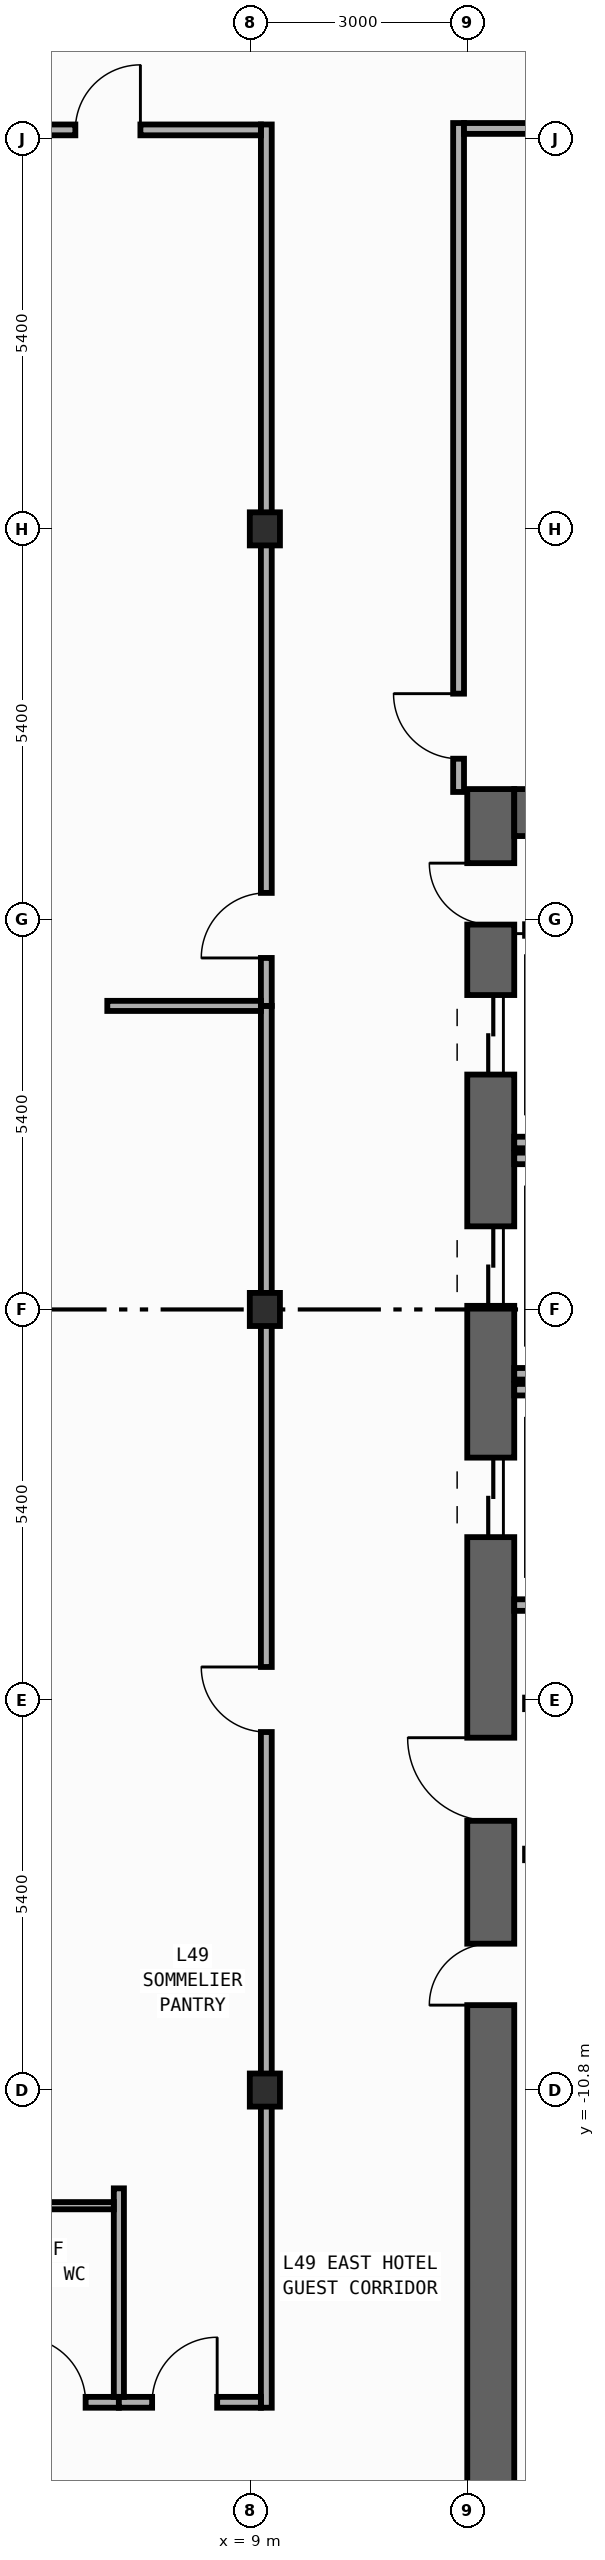
"""IFC4 building model, lengths in metres.
Left out: names, types, materials, properties, quantities, classifications, styles, units other than length and angle.
Written with IfcOpenShell. Run it as: python <this file> out.ifc"""

import sys

from ifc_helpers import new_model, si_unit, direction, frame, frame_2d, origin, origin_2d, place, context, subcontext, project, spatial, rectangle, i_section, extrude, element, fill, save


model = new_model("IFC4")
c1 = context("Model", 3, precision=1e-05, world=origin(), true_north=direction((0.0, 1.0)))
c2 = subcontext(c1, "Body", "Model", "MODEL_VIEW")
j1 = project(units=[si_unit("LENGTHUNIT", "METRE"), si_unit("PLANEANGLEUNIT", "RADIAN")], contexts=[c1])
p1 = place(None, origin())
s1 = spatial("IfcSite", under=j1, at=p1, CompositionType="ELEMENT")
p2 = place(p1, origin())
s2 = spatial("IfcBuilding", under=s1, at=p2, CompositionType="ELEMENT")
p3 = place(p2, frame((0.0, 0.0, 210.6)))
s3 = spatial("IfcBuildingStorey", under=s2, at=p3, CompositionType="ELEMENT", Elevation=210.6)
p4 = place(p3, frame((12.325, -19.8, 0.0), z_axis=(0.0, 0.0, 1.0), x_axis=(0.0, 1.0, 0.0)))
e1 = element("IfcWall", 1, at=p4, inside=s3, PredefinedType="SHEAR", context=c2, shape_type="SweptSolid", body=[
    extrude(rectangle(XDim=27.0, YDim=0.65, at=frame_2d((13.5, 0.0))), origin(), (0.0, 0.0, 1.0), 3.45),
])
p5 = place(p4, frame((23.05, 0.0, 0.0)))
e2 = element("IfcOpeningElement", 2, at=p5, cuts=e1, PredefinedType="OPENING", context=c2, shape_type="SweptSolid", body=[
    extrude(rectangle(XDim=1.1, YDim=2.2, at=frame_2d((0.55, 1.1))), frame((0.0, 0.335, 0.0), z_axis=(0.0, -1.0, 0.0), x_axis=(1.0, 0.0, 0.0)), (0.0, 0.0, 1.0), 0.67),
])
p6 = place(p4, frame((19.85, 0.0, 0.0)))
e3 = element("IfcOpeningElement", 3, at=p6, cuts=e1, PredefinedType="OPENING", context=c2, shape_type="SweptSolid", body=[
    extrude(rectangle(XDim=1.1, YDim=2.2, at=frame_2d((0.55, 1.1))), frame((0.0, 0.335, 0.0), z_axis=(0.0, -1.0, 0.0), x_axis=(1.0, 0.0, 0.0)), (0.0, 0.0, 1.0), 0.67),
])
p7 = place(p4, frame((16.65, 0.0, 0.0)))
e4 = element("IfcOpeningElement", 4, at=p7, cuts=e1, PredefinedType="OPENING", context=c2, shape_type="SweptSolid", body=[
    extrude(rectangle(XDim=1.1, YDim=2.2, at=frame_2d((0.55, 1.1))), frame((0.0, 0.335, 0.0), z_axis=(0.0, -1.0, 0.0), x_axis=(1.0, 0.0, 0.0)), (0.0, 0.0, 1.0), 0.67),
])
p8 = place(p4, frame((10.175, 0.0, 0.0)))
e5 = element("IfcOpeningElement", 5, at=p8, cuts=e1, PredefinedType="OPENING", context=c2, shape_type="SweptSolid", body=[
    extrude(rectangle(XDim=0.85, YDim=2.1, at=frame_2d((0.425, 1.05))), frame((0.0, 0.335, 0.0), z_axis=(0.0, -1.0, 0.0), x_axis=(1.0, 0.0, 0.0)), (0.0, 0.0, 1.0), 0.67),
])
p9 = place(p4, frame((12.725, 0.0, 0.0)))
e6 = element("IfcOpeningElement", 6, at=p9, cuts=e1, PredefinedType="OPENING", context=c2, shape_type="SweptSolid", body=[
    extrude(rectangle(XDim=1.15, YDim=2.2, at=frame_2d((0.575, 1.1))), frame((0.0, 0.335, 0.0), z_axis=(0.0, -1.0, 0.0), x_axis=(1.0, 0.0, 0.0)), (0.0, 0.0, 1.0), 0.67),
])
p10 = place(p4, frame((25.125, 0.0, 0.0)))
e7 = element("IfcOpeningElement", 7, at=p10, cuts=e1, PredefinedType="OPENING", context=c2, shape_type="SweptSolid", body=[
    extrude(rectangle(XDim=0.85, YDim=2.1, at=frame_2d((0.425, 1.05))), frame((0.0, 0.335, 0.0), z_axis=(0.0, -1.0, 0.0), x_axis=(1.0, 0.0, 0.0)), (0.0, 0.0, 1.0), 0.67),
])
p11 = place(p3, frame((12.65, 6.875, 0.0), z_axis=(0.0, 0.0, 1.0), x_axis=(1.0, 0.0, 0.0)))
e8 = element("IfcWall", 8, at=p11, inside=s3, PredefinedType="SHEAR", context=c2, shape_type="SweptSolid", body=[
    extrude(rectangle(XDim=7.1, YDim=0.65, at=frame_2d((3.55, 0.0))), origin(), (0.0, 0.0, 1.0), 3.45),
])
for number, where, z_axis, x_axis in (
    (9, (9.2, -10.8, 0.0), (0.0, 0.0, 1.0), (1.0, 0.0, 0.0)),
    (10, (9.2, 0.0, 0.0), (0.0, 0.0, 1.0), (1.0, 0.0, 0.0)),
    (11, (9.2, 10.8, 0.0), (0.0, 0.0, 1.0), (1.0, 0.0, 0.0)),
):
    element("IfcColumn", number, at=place(p3, frame(where, z_axis=z_axis, x_axis=x_axis)), inside=s3, PredefinedType="COLUMN", context=c2, shape_type="SweptSolid", body=[
        extrude(i_section(OverallWidth=0.417, OverallDepth=0.458, WebThickness=0.03, FlangeThickness=0.05, FilletRadius=0.022, at=origin_2d()), origin(), (0.0, 0.0, 1.0), 3.8),
    ])
for number, where, z_axis, x_axis in (
    (12, (12.65, 2.31, 0.0), (0.0, 0.0, 1.0), (1.0, 0.0, 0.0)),
    (13, (12.65, -0.89, 0.0), (0.0, 0.0, 1.0), (1.0, 0.0, 0.0)),
    (14, (12.65, 2.09, 0.0), (0.0, 0.0, 1.0), (1.0, 0.0, 0.0)),
    (15, (12.65, -4.09, 0.0), (0.0, 0.0, 1.0), (1.0, 0.0, 0.0)),
    (16, (12.65, -1.11, 0.0), (0.0, 0.0, 1.0), (1.0, 0.0, 0.0)),
):
    element("IfcWall", number, at=place(p3, frame(where, z_axis=z_axis, x_axis=x_axis)), inside=s3, PredefinedType="STANDARD", context=c2, shape_type="SweptSolid", body=[
        extrude(rectangle(XDim=2.34, YDim=0.16, at=frame_2d((1.17, 0.0))), origin(), (0.0, 0.0, 1.0), 3.45),
    ])
for number, where, z_axis, x_axis in (
    (17, (12.8, -5.45, 0.0), (0.0, 0.0, 1.0), (1.0, 0.0, 0.0)),
    (18, (12.8, -7.54, 0.0), (0.0, 0.0, 1.0), (1.0, 0.0, 0.0)),
    (19, (12.8, 5.25, 0.0), (0.0, 0.0, 1.0), (1.0, 0.0, 0.0)),
):
    element("IfcWall", number, at=place(p3, frame(where, z_axis=z_axis, x_axis=x_axis)), inside=s3, PredefinedType="STANDARD", context=c2, shape_type="SweptSolid", body=[
        extrude(rectangle(XDim=2.6, YDim=0.16, at=frame_2d((1.3, 0.0))), origin(), (0.0, 0.0, 1.0), 3.45),
    ])
p12 = place(p3, frame((9.22, -15.195, 0.0), z_axis=(0.0, 0.0, 1.0), x_axis=(0.0, 1.0, 0.0)))
e20 = element("IfcWall", 20, at=p12, inside=s3, PredefinedType="PARTITIONING", context=c2, shape_type="SweptSolid", body=[
    extrude(rectangle(XDim=19.395, YDim=0.15, at=frame_2d((9.698, 0.0))), origin(), (0.0, 0.0, 1.0), 2.862),
])
p13 = place(p12, frame((9.348, 0.0, 0.0)))
e21 = element("IfcOpeningElement", 21, at=p13, cuts=e20, PredefinedType="OPENING", context=c2, shape_type="SweptSolid", body=[
    extrude(rectangle(XDim=0.9, YDim=2.15, at=frame_2d((0.45, 1.075))), frame((0.0, 0.085, 0.0), z_axis=(0.0, -1.0, 0.0), x_axis=(1.0, 0.0, 0.0)), (0.0, 0.0, 1.0), 0.17),
])
p14 = place(p3, frame((9.22, 4.2, 0.0), z_axis=(0.0, 0.0, 1.0), x_axis=(0.0, 1.0, 0.0)))
e22 = element("IfcWall", 22, at=p14, inside=s3, PredefinedType="PARTITIONING", context=c2, shape_type="SweptSolid", body=[
    extrude(rectangle(XDim=12.195, YDim=0.15, at=frame_2d((6.098, 0.0))), origin(), (0.0, 0.0, 1.0), 2.862),
])
p15 = place(p14, frame((0.663, 0.0, 0.0)))
e23 = element("IfcOpeningElement", 23, at=p15, cuts=e22, PredefinedType="OPENING", context=c2, shape_type="SweptSolid", body=[
    extrude(rectangle(XDim=0.9, YDim=2.15, at=frame_2d((0.45, 1.075))), frame((0.0, 0.085, 0.0), z_axis=(0.0, -1.0, 0.0), x_axis=(1.0, 0.0, 0.0)), (0.0, 0.0, 1.0), 0.17),
])
p16 = place(p3, frame((11.88, 7.16, 0.0), z_axis=(0.0, 0.0, 1.0), x_axis=(0.0, 1.0, 0.0)))
e24 = element("IfcWall", 24, at=p16, inside=s3, PredefinedType="PARTITIONING", context=c2, shape_type="SweptSolid", body=[
    extrude(rectangle(XDim=9.255, YDim=0.15, at=frame_2d((4.627, 0.0))), origin(), (0.0, 0.0, 1.0), 3.45),
])
p17 = place(p16, frame((0.46, 0.0, 0.0)))
e25 = element("IfcOpeningElement", 25, at=p17, cuts=e24, PredefinedType="OPENING", context=c2, shape_type="SweptSolid", body=[
    extrude(rectangle(XDim=0.9, YDim=2.15, at=frame_2d((0.45, 1.075))), frame((0.0, 0.085, 0.0), z_axis=(0.0, -1.0, 0.0), x_axis=(1.0, 0.0, 0.0)), (0.0, 0.0, 1.0), 0.17),
])
p18 = place(p3, frame((-0.32, 16.32, 0.0), z_axis=(0.0, 0.0, 1.0), x_axis=(1.0, 0.0, 0.0)))
e26 = element("IfcWall", 26, at=p18, inside=s3, PredefinedType="PARTITIONING", context=c2, shape_type="SweptSolid", body=[
    extrude(rectangle(XDim=9.465, YDim=0.15, at=frame_2d((4.732, 0.0))), origin(), (0.0, 0.0, 1.0), 3.45),
])
p19 = place(p18, frame((6.898, 0.0, 0.0)))
e27 = element("IfcOpeningElement", 27, at=p19, cuts=e26, PredefinedType="OPENING", context=c2, shape_type="SweptSolid", body=[
    extrude(rectangle(XDim=0.9, YDim=2.15, at=frame_2d((0.45, 1.075))), frame((0.0, 0.085, 0.0), z_axis=(0.0, -1.0, 0.0), x_axis=(1.0, 0.0, 0.0)), (0.0, 0.0, 1.0), 0.17),
])
p20 = place(p3, frame((11.955, 16.34, 0.0), z_axis=(0.0, 0.0, 1.0), x_axis=(1.0, 0.0, 0.0)))
e28 = element("IfcWall", 28, at=p20, inside=s3, PredefinedType="PARTITIONING", context=c2, shape_type="SweptSolid", body=[
    extrude(rectangle(XDim=10.5, YDim=0.15, at=frame_2d((5.25, 0.0))), origin(), (0.0, 0.0, 1.0), 3.45),
])
p21 = place(p20, frame((4.901, 0.0, 0.0)))
e29 = element("IfcOpeningElement", 29, at=p21, cuts=e28, PredefinedType="OPENING", context=c2, shape_type="SweptSolid", body=[
    extrude(rectangle(XDim=0.9, YDim=2.15, at=frame_2d((0.45, 1.075))), frame((0.0, 0.085, 0.0), z_axis=(0.0, -1.0, 0.0), x_axis=(1.0, 0.0, 0.0)), (0.0, 0.0, 1.0), 0.17),
])
p22 = place(p3, frame((4.28, -15.12, 0.0), z_axis=(0.0, 0.0, 1.0), x_axis=(1.0, 0.0, 0.0)))
e30 = element("IfcWall", 30, at=p22, inside=s3, PredefinedType="PARTITIONING", context=c2, shape_type="SweptSolid", body=[
    extrude(rectangle(XDim=2.9, YDim=0.15, at=frame_2d((1.45, 0.0))), origin(), (0.0, 0.0, 1.0), 3.45),
])
p23 = place(p22, frame((1.54, 0.0, 0.0)))
e31 = element("IfcOpeningElement", 31, at=p23, cuts=e30, PredefinedType="OPENING", context=c2, shape_type="SweptSolid", body=[
    extrude(rectangle(XDim=0.9, YDim=2.15, at=frame_2d((0.45, 1.075))), frame((0.0, 0.085, 0.0), z_axis=(0.0, -1.0, 0.0), x_axis=(1.0, 0.0, 0.0)), (0.0, 0.0, 1.0), 0.17),
])
p24 = place(p3, frame((7.18, -15.12, 0.0), z_axis=(0.0, 0.0, 1.0), x_axis=(1.0, 0.0, 0.0)))
e32 = element("IfcWall", 32, at=p24, inside=s3, PredefinedType="PARTITIONING", context=c2, shape_type="SweptSolid", body=[
    extrude(rectangle(XDim=1.965, YDim=0.15, at=frame_2d((0.982, 0.0))), origin(), (0.0, 0.0, 1.0), 3.45),
])
p25 = place(p24, frame((0.46, 0.0, 0.0)))
e33 = element("IfcOpeningElement", 33, at=p25, cuts=e32, PredefinedType="OPENING", context=c2, shape_type="SweptSolid", body=[
    extrude(rectangle(XDim=0.9, YDim=2.15, at=frame_2d((0.45, 1.075))), frame((0.0, 0.085, 0.0), z_axis=(0.0, -1.0, 0.0), x_axis=(1.0, 0.0, 0.0)), (0.0, 0.0, 1.0), 0.17),
])
p26 = place(p3, frame((7.18, -15.045, 0.0), z_axis=(0.0, 0.0, 1.0), x_axis=(0.0, 1.0, 0.0)))
e34 = element("IfcWall", 34, at=p26, inside=s3, PredefinedType="PARTITIONING", context=c2, shape_type="SweptSolid", body=[
    extrude(rectangle(XDim=2.885, YDim=0.14, at=frame_2d((1.442, 0.0))), origin(), (0.0, 0.0, 1.0), 3.45),
])
p27 = place(p3, frame((7.02, 4.2, 0.0), z_axis=(0.0, 0.0, 1.0), x_axis=(1.0, 0.0, 0.0)))
e35 = element("IfcWall", 35, at=p27, inside=s3, PredefinedType="PARTITIONING", context=c2, shape_type="SweptSolid", body=[
    extrude(rectangle(XDim=2.125, YDim=0.14, at=frame_2d((1.062, 0.0))), origin(), (0.0, 0.0, 1.0), 3.45),
])
p28 = place(p3, frame((4.35, -12.4, 0.0), z_axis=(0.0, 0.0, 1.0), x_axis=(1.0, 0.0, 0.0)))
e36 = element("IfcWall", 36, at=p28, inside=s3, PredefinedType="PARTITIONING", context=c2, shape_type="SweptSolid", body=[
    extrude(rectangle(XDim=2.76, YDim=0.1, at=frame_2d((1.38, 0.0))), origin(), (0.0, 0.0, 1.0), 3.45),
])
p29 = place(p5, origin())
e37 = element("IfcDoor", 37, at=p29, inside=s3, OperationType="DOUBLE_DOOR_SLIDING", PredefinedType="DOOR", context=c2, shape_type="SweptSolid", body=[
    extrude(rectangle(XDim=1.1, YDim=2.2, at=frame_2d((0.55, 1.1))), frame((0.0, 0.025, 0.0), z_axis=(0.0, -1.0, 0.0), x_axis=(1.0, 0.0, 0.0)), (0.0, 0.0, 1.0), 0.05),
])
fill(e2, e37)
p30 = place(p6, origin())
e38 = element("IfcDoor", 38, at=p30, inside=s3, OperationType="DOUBLE_DOOR_SLIDING", PredefinedType="DOOR", context=c2, shape_type="SweptSolid", body=[
    extrude(rectangle(XDim=1.1, YDim=2.2, at=frame_2d((0.55, 1.1))), frame((0.0, 0.025, 0.0), z_axis=(0.0, -1.0, 0.0), x_axis=(1.0, 0.0, 0.0)), (0.0, 0.0, 1.0), 0.05),
])
fill(e3, e38)
p31 = place(p7, origin())
e39 = element("IfcDoor", 39, at=p31, inside=s3, OperationType="DOUBLE_DOOR_SLIDING", PredefinedType="DOOR", context=c2, shape_type="SweptSolid", body=[
    extrude(rectangle(XDim=1.1, YDim=2.2, at=frame_2d((0.55, 1.1))), frame((0.0, 0.025, 0.0), z_axis=(0.0, -1.0, 0.0), x_axis=(1.0, 0.0, 0.0)), (0.0, 0.0, 1.0), 0.05),
])
fill(e4, e39)
p32 = place(p8, origin())
e40 = element("IfcDoor", 40, at=p32, inside=s3, OperationType="SINGLE_SWING_LEFT", PredefinedType="DOOR", context=c2, shape_type="SweptSolid", body=[
    extrude(rectangle(XDim=0.85, YDim=2.1, at=frame_2d((0.425, 1.05))), frame((0.0, 0.025, 0.0), z_axis=(0.0, -1.0, 0.0), x_axis=(1.0, 0.0, 0.0)), (0.0, 0.0, 1.0), 0.05),
])
fill(e5, e40)
p33 = place(p9, origin())
e41 = element("IfcDoor", 41, at=p33, inside=s3, OperationType="SINGLE_SWING_RIGHT", PredefinedType="DOOR", context=c2, shape_type="SweptSolid", body=[
    extrude(rectangle(XDim=1.15, YDim=2.2, at=frame_2d((0.575, 1.1))), frame((0.0, 0.025, 0.0), z_axis=(0.0, -1.0, 0.0), x_axis=(1.0, 0.0, 0.0)), (0.0, 0.0, 1.0), 0.05),
])
fill(e6, e41)
p34 = place(p10, origin())
e42 = element("IfcDoor", 42, at=p34, inside=s3, OperationType="SINGLE_SWING_RIGHT", PredefinedType="DOOR", context=c2, shape_type="SweptSolid", body=[
    extrude(rectangle(XDim=0.85, YDim=2.1, at=frame_2d((0.425, 1.05))), frame((0.0, 0.025, 0.0), z_axis=(0.0, -1.0, 0.0), x_axis=(1.0, 0.0, 0.0)), (0.0, 0.0, 1.0), 0.05),
])
fill(e7, e42)
p35 = place(p13, origin())
e43 = element("IfcDoor", 43, at=p35, inside=s3, OperationType="SINGLE_SWING_RIGHT", PredefinedType="DOOR", context=c2, shape_type="SweptSolid", body=[
    extrude(rectangle(XDim=0.9, YDim=2.15, at=frame_2d((0.45, 1.075))), frame((0.0, 0.025, 0.0), z_axis=(0.0, -1.0, 0.0), x_axis=(1.0, 0.0, 0.0)), (0.0, 0.0, 1.0), 0.05),
])
fill(e21, e43)
p36 = place(p15, origin())
e44 = element("IfcDoor", 44, at=p36, inside=s3, OperationType="SINGLE_SWING_LEFT", PredefinedType="DOOR", context=c2, shape_type="SweptSolid", body=[
    extrude(rectangle(XDim=0.9, YDim=2.15, at=frame_2d((0.45, 1.075))), frame((0.0, 0.025, 0.0), z_axis=(0.0, -1.0, 0.0), x_axis=(1.0, 0.0, 0.0)), (0.0, 0.0, 1.0), 0.05),
])
fill(e23, e44)
p37 = place(p17, origin())
e45 = element("IfcDoor", 45, at=p37, inside=s3, OperationType="SINGLE_SWING_RIGHT", PredefinedType="DOOR", context=c2, shape_type="SweptSolid", body=[
    extrude(rectangle(XDim=0.9, YDim=2.15, at=frame_2d((0.45, 1.075))), frame((0.0, 0.025, 0.0), z_axis=(0.0, -1.0, 0.0), x_axis=(1.0, 0.0, 0.0)), (0.0, 0.0, 1.0), 0.05),
])
fill(e25, e45)
p38 = place(p19, origin())
e46 = element("IfcDoor", 46, at=p38, inside=s3, OperationType="SINGLE_SWING_RIGHT", PredefinedType="DOOR", context=c2, shape_type="SweptSolid", body=[
    extrude(rectangle(XDim=0.9, YDim=2.15, at=frame_2d((0.45, 1.075))), frame((0.0, 0.025, 0.0), z_axis=(0.0, -1.0, 0.0), x_axis=(1.0, 0.0, 0.0)), (0.0, 0.0, 1.0), 0.05),
])
fill(e27, e46)
p39 = place(p23, origin())
e47 = element("IfcDoor", 47, at=p39, inside=s3, OperationType="SINGLE_SWING_LEFT", PredefinedType="DOOR", context=c2, shape_type="SweptSolid", body=[
    extrude(rectangle(XDim=0.9, YDim=2.15, at=frame_2d((0.45, 1.075))), frame((0.0, 0.025, 0.0), z_axis=(0.0, -1.0, 0.0), x_axis=(1.0, 0.0, 0.0)), (0.0, 0.0, 1.0), 0.05),
])
fill(e31, e47)
p40 = place(p25, origin())
e48 = element("IfcDoor", 48, at=p40, inside=s3, OperationType="SINGLE_SWING_RIGHT", PredefinedType="DOOR", context=c2, shape_type="SweptSolid", body=[
    extrude(rectangle(XDim=0.9, YDim=2.15, at=frame_2d((0.45, 1.075))), frame((0.0, 0.025, 0.0), z_axis=(0.0, -1.0, 0.0), x_axis=(1.0, 0.0, 0.0)), (0.0, 0.0, 1.0), 0.05),
])
fill(e33, e48)
save(model, sys.argv[1])
